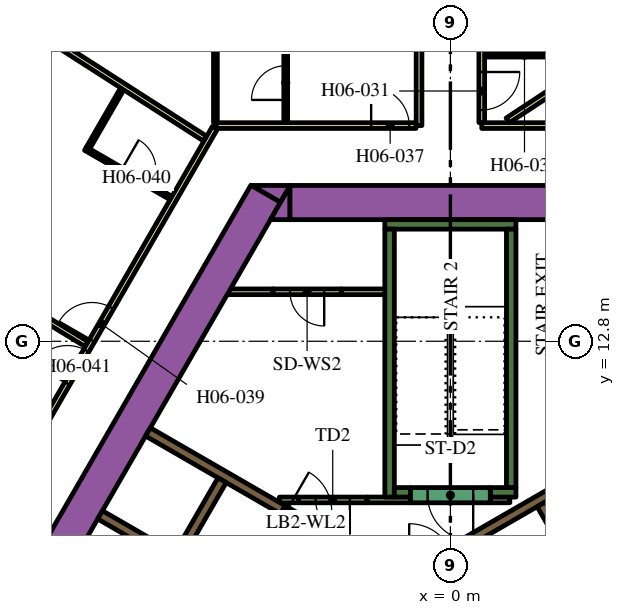
"""IFC4 building model, lengths in metres.
Left out: names, types, materials, properties, quantities, classifications, styles, units other than length and angle.
Written with IfcOpenShell. Run it as: python <this file> out.ifc"""

import sys

from ifc_helpers import new_model, si_unit, direction, frame, frame_2d, origin, place, context, subcontext, project, spatial, polyline, rectangle, outline, extrude, element, fill, save


model = new_model("IFC4")
c1 = context("Model", 3, precision=1e-05, world=origin(), true_north=direction((0.0, 1.0)))
c2 = subcontext(c1, "Body", "Model", "MODEL_VIEW")
j1 = project(units=[si_unit("LENGTHUNIT", "METRE"), si_unit("PLANEANGLEUNIT", "RADIAN")], contexts=[c1])
p1 = place(None, origin())
s1 = spatial("IfcSite", under=j1, at=p1, CompositionType="ELEMENT")
p2 = place(p1, origin())
s2 = spatial("IfcBuilding", under=s1, at=p2, CompositionType="ELEMENT")
p3 = place(p2, frame((0.0, 0.0, 91.5)))
s3 = spatial("IfcBuildingStorey", under=s2, at=p3, CompositionType="ELEMENT", Elevation=91.5)
p4 = place(p3, frame((-15.36, -1.503, 0.0), z_axis=(0.0, 0.0, 1.0), x_axis=(0.50000389221, 0.866023156604, 0.0)))
e1 = element("IfcWall", 1, at=p4, inside=s3, PredefinedType="SOLIDWALL", context=c2, shape_type="SweptSolid", body=[
    extrude(rectangle(XDim=21.0, YDim=0.9, at=frame_2d((10.5, 0.0))), origin(), (0.0, 0.0, 1.0), 3.9),
])
p5 = place(p3, origin())
e2 = element("IfcWall", 2, at=p5, inside=s3, PredefinedType="SOLIDWALL", context=c2, shape_type="SweptSolid", body=[
    extrude(outline(polyline([(-4.215, 16.9), (-4.469, 16.46), (-5.231, 16.9), (-4.215, 16.9)])), origin(), (0.0, 0.0, 1.0), 3.9),
])
p6 = place(p3, frame((-4.224, 16.45, 0.0), z_axis=(0.0, 0.0, 1.0), x_axis=(1.0, 0.0, 0.0)))
e3 = element("IfcWall", 3, at=p6, inside=s3, PredefinedType="SOLIDWALL", context=c2, shape_type="SweptSolid", body=[
    extrude(rectangle(XDim=9.488, YDim=0.9, at=frame_2d((4.744, 0.0))), origin(), (0.0, 0.0, 1.0), 3.9),
])
e4 = element("IfcWall", 4, at=p5, inside=s3, PredefinedType="SOLIDWALL", context=c2, shape_type="SweptSolid", body=[
    extrude(outline(polyline([(-4.734, 16.0), (-4.226, 16.88), (-4.226, 16.0), (-4.734, 16.0)])), origin(), (0.0, 0.0, 1.0), 3.9),
])
p7 = place(p3, frame((-1.725, 15.875, 0.0), z_axis=(0.0, 0.0, 1.0), x_axis=(1.0, 0.0, 0.0)))
e5 = element("IfcWall", 5, at=p7, inside=s3, PredefinedType="SOLIDWALL", context=c2, shape_type="SweptSolid", body=[
    extrude(rectangle(XDim=3.45, YDim=0.25, at=frame_2d((1.725, 0.0))), origin(), (0.0, 0.0, 1.0), 3.9),
])
p8 = place(p3, frame((1.6, 8.95, 0.0), z_axis=(0.0, 0.0, 1.0), x_axis=(0.0, 1.0, 0.0)))
e6 = element("IfcWall", 6, at=p8, inside=s3, PredefinedType="SOLIDWALL", context=c2, shape_type="SweptSolid", body=[
    extrude(rectangle(XDim=6.8, YDim=0.25, at=frame_2d((3.4, 0.0))), origin(), (0.0, 0.0, 1.0), 3.9),
])
p9 = place(p3, frame((1.05, 8.825, 0.0), z_axis=(0.0, 0.0, 1.0), x_axis=(1.0, 0.0, 0.0)))
e7 = element("IfcWall", 7, at=p9, inside=s3, PredefinedType="SOLIDWALL", context=c2, shape_type="SweptSolid", body=[
    extrude(rectangle(XDim=0.675, YDim=0.25, at=frame_2d((0.337, 0.0))), origin(), (0.0, 0.0, 1.0), 3.9),
])
p10 = place(p3, frame((-1.6, 8.7, 0.0), z_axis=(0.0, 0.0, 1.0), x_axis=(0.0, 1.0, 0.0)))
e8 = element("IfcWall", 8, at=p10, inside=s3, PredefinedType="SOLIDWALL", context=c2, shape_type="SweptSolid", body=[
    extrude(rectangle(XDim=7.05, YDim=0.25, at=frame_2d((3.525, 0.0))), origin(), (0.0, 0.0, 1.0), 3.9),
])
p11 = place(p3, frame((-1.475, 8.825, 0.0), z_axis=(0.0, 0.0, 1.0), x_axis=(1.0, 0.0, 0.0)))
e9 = element("IfcWall", 9, at=p11, inside=s3, PredefinedType="SOLIDWALL", context=c2, shape_type="SweptSolid", body=[
    extrude(rectangle(XDim=0.425, YDim=0.25, at=frame_2d((0.212, 0.0))), origin(), (0.0, 0.0, 1.0), 3.9),
])
p12 = place(p3, frame((0.314, 7.456, 0.0), z_axis=(0.0, 0.0, 1.0), x_axis=(0.866013897511, 0.50001992892, 0.0)))
e10 = element("IfcWall", 10, at=p12, inside=s3, PredefinedType="SOLIDWALL", context=c2, shape_type="SweptSolid", body=[
    extrude(rectangle(XDim=3.268, YDim=0.25, at=frame_2d((1.634, 0.0))), origin(), (0.0, 0.0, 1.0), 3.9),
])
e11 = element("IfcWall", 11, at=p5, inside=s3, PredefinedType="SOLIDWALL", context=c2, shape_type="SweptSolid", body=[
    extrude(outline(polyline([(-3.128, 7.481), (-3.259, 7.557), (-3.134, 7.773), (-3.003, 7.698), (-3.128, 7.481)])), origin(), (0.0, 0.0, 1.0), 3.9),
])
p13 = place(p3, frame((-7.314, 7.132, 0.0), z_axis=(0.0, 0.0, 1.0), x_axis=(-0.866008176907, 0.50002983664, 0.0)))
e12 = element("IfcWall", 12, at=p13, inside=s3, PredefinedType="SOLIDWALL", context=c2, shape_type="SweptSolid", body=[
    extrude(rectangle(XDim=2.2, YDim=0.25, at=frame_2d((1.1, 0.0))), origin(), (0.0, 0.0, 1.0), 3.9),
])
p14 = place(p3, frame((-7.959, 10.415, 0.0), z_axis=(0.0, 0.0, 1.0), x_axis=(0.866020958405, -0.500007699544, 0.0)))
e13 = element("IfcWall", 13, at=p14, inside=s3, PredefinedType="SOLIDWALL", context=c2, shape_type="SweptSolid", body=[
    extrude(rectangle(XDim=4.1, YDim=0.25, at=frame_2d((2.05, 0.0))), origin(), (0.0, 0.0, 1.0), 3.9),
])
p15 = place(p3, frame((-3.997, 8.625, 0.0), z_axis=(0.0, 0.0, 1.0), x_axis=(-1.0, 0.0, 0.0)))
e14 = element("IfcWall", 14, at=p15, inside=s3, PredefinedType="PARTITIONING", context=c2, shape_type="SweptSolid", body=[
    extrude(rectangle(XDim=0.502, YDim=0.15, at=frame_2d((0.251, 0.0))), origin(), (0.0, 0.0, 1.0), 2.75),
])
p16 = place(p3, frame((-2.196, 8.625, 0.0), z_axis=(0.0, 0.0, 1.0), x_axis=(1.0, 0.0, 0.0)))
e15 = element("IfcWall", 15, at=p16, inside=s3, PredefinedType="PARTITIONING", context=c2, shape_type="SweptSolid", body=[
    extrude(rectangle(XDim=1.146, YDim=0.15, at=frame_2d((0.573, 0.0))), origin(), (0.0, 0.0, 1.0), 2.75),
])
p17 = place(p3, frame((-5.851, 14.102, 0.0), z_axis=(0.0, 0.0, 1.0), x_axis=(1.0, 0.0, 0.0)))
e16 = element("IfcWall", 16, at=p17, inside=s3, PredefinedType="PARTITIONING", context=c2, shape_type="SweptSolid", body=[
    extrude(rectangle(XDim=1.18, YDim=0.15, at=frame_2d((0.59, 0.0))), origin(), (0.0, 0.0, 1.0), 2.75),
])
p18 = place(p3, frame((-2.871, 14.102, 0.0), z_axis=(0.0, 0.0, 1.0), x_axis=(1.0, 0.0, 0.0)))
e17 = element("IfcWall", 17, at=p18, inside=s3, PredefinedType="PARTITIONING", context=c2, shape_type="SweptSolid", body=[
    extrude(rectangle(XDim=1.196, YDim=0.15, at=frame_2d((0.598, 0.0))), origin(), (0.0, 0.0, 1.0), 2.75),
])
p19 = place(p3, frame((1.05, 8.625, 0.0), z_axis=(0.0, 0.0, 1.0), x_axis=(1.0, 0.0, 0.0)))
e18 = element("IfcWall", 18, at=p19, inside=s3, PredefinedType="PARTITIONING", context=c2, shape_type="SweptSolid", body=[
    extrude(rectangle(XDim=0.514, YDim=0.15, at=frame_2d((0.257, 0.0))), origin(), (0.0, 0.0, 1.0), 2.75),
])
p20 = place(p3, frame((8.565, -2.185, 0.0), z_axis=(0.0, 0.0, 1.0), x_axis=(-0.499997954832, 0.866026584559, 0.0)))
e19 = element("IfcWall", 19, at=p20, inside=s3, PredefinedType="SOLIDWALL", context=c2, shape_type="SweptSolid", body=[
    extrude(rectangle(XDim=12.35, YDim=0.25, at=frame_2d((6.175, 0.0))), origin(), (0.0, 0.0, 1.0), 3.9),
])
p21 = place(p20, frame((5.725, 0.0, 0.0)))
e20 = element("IfcOpeningElement", 20, at=p21, cuts=e19, PredefinedType="OPENING", context=c2, shape_type="SweptSolid", body=[
    extrude(rectangle(XDim=0.9, YDim=2.1, at=frame_2d((0.45, 1.05))), frame((0.0, 0.135, 0.0), z_axis=(0.0, -1.0, 0.0), x_axis=(1.0, 0.0, 0.0)), (0.0, 0.0, 1.0), 0.27),
])
p22 = place(p3, frame((-6.008, 9.144, 0.0), z_axis=(0.0, 0.0, 1.0), x_axis=(-0.500006956611, -0.866021387346, 0.0)))
e21 = element("IfcWall", 21, at=p22, inside=s3, PredefinedType="SOLIDWALL", context=c2, shape_type="SweptSolid", body=[
    extrude(rectangle(XDim=9.83, YDim=0.25, at=frame_2d((4.915, 0.0))), origin(), (0.0, 0.0, 1.0), 3.9),
])
p23 = place(p22, frame((6.985, 0.0, 0.0)))
e22 = element("IfcOpeningElement", 22, at=p23, cuts=e21, PredefinedType="OPENING", context=c2, shape_type="SweptSolid", body=[
    extrude(rectangle(XDim=0.9, YDim=2.1, at=frame_2d((0.45, 1.05))), frame((0.0, 0.135, 0.0), z_axis=(0.0, -1.0, 0.0), x_axis=(1.0, 0.0, 0.0)), (0.0, 0.0, 1.0), 0.27),
])
p24 = place(p3, frame((1.05, 8.75, 0.0), z_axis=(0.0, 0.0, 1.0), x_axis=(-1.0, 0.0, 0.0)))
e23 = element("IfcWall", 23, at=p24, inside=s3, PredefinedType="SOLIDWALL", context=c2, shape_type="SweptSolid", body=[
    extrude(rectangle(XDim=2.1, YDim=0.4, at=frame_2d((1.05, 0.0))), origin(), (0.0, 0.0, 1.0), 3.9),
])
p25 = place(p24, frame((0.45, 0.0, 0.0)))
e24 = element("IfcOpeningElement", 24, at=p25, cuts=e23, PredefinedType="OPENING", context=c2, shape_type="SweptSolid", body=[
    extrude(rectangle(XDim=1.2, YDim=2.1, at=frame_2d((0.6, 1.05))), frame((0.0, 0.21, 0.0), z_axis=(0.0, -1.0, 0.0), x_axis=(1.0, 0.0, 0.0)), (0.0, 0.0, 1.0), 0.42),
])
p26 = place(p3, frame((-2.196, 8.625, 0.0), z_axis=(0.0, 0.0, 1.0), x_axis=(-1.0, 0.0, 0.0)))
e25 = element("IfcWall", 25, at=p26, inside=s3, PredefinedType="PARTITIONING", context=c2, shape_type="SweptSolid", body=[
    extrude(rectangle(XDim=1.8, YDim=0.15, at=frame_2d((0.9, 0.0))), origin(), (0.0, 0.0, 1.0), 2.75),
])
p27 = place(p26, frame((0.45, 0.0, 0.0)))
e26 = element("IfcOpeningElement", 26, at=p27, cuts=e25, PredefinedType="OPENING", context=c2, shape_type="SweptSolid", body=[
    extrude(rectangle(XDim=0.9, YDim=2.1, at=frame_2d((0.45, 1.05))), frame((0.0, 0.085, 0.0), z_axis=(0.0, -1.0, 0.0), x_axis=(1.0, 0.0, 0.0)), (0.0, 0.0, 1.0), 0.17),
])
p28 = place(p3, frame((-4.409, 8.365, 0.0), z_axis=(0.0, 0.0, 1.0), x_axis=(0.866034573852, -0.49998411664, 0.0)))
e27 = element("IfcWall", 27, at=p28, inside=s3, PredefinedType="SOLIDWALL", context=c2, shape_type="SweptSolid", body=[
    extrude(rectangle(XDim=1.4, YDim=0.25, at=frame_2d((0.7, 0.0))), origin(), (0.0, 0.0, 1.0), 3.9),
])
p29 = place(p28, frame((0.1, 0.0, 0.0)))
e28 = element("IfcOpeningElement", 28, at=p29, cuts=e27, PredefinedType="OPENING", context=c2, shape_type="SweptSolid", body=[
    extrude(rectangle(XDim=1.2, YDim=2.1, at=frame_2d((0.6, 1.05))), frame((0.0, 0.135, 0.0), z_axis=(0.0, -1.0, 0.0), x_axis=(1.0, 0.0, 0.0)), (0.0, 0.0, 1.0), 0.27),
])
p30 = place(p3, frame((-2.871, 14.102, 0.0), z_axis=(0.0, 0.0, 1.0), x_axis=(-1.0, 0.0, 0.0)))
e29 = element("IfcWall", 29, at=p30, inside=s3, PredefinedType="PARTITIONING", context=c2, shape_type="SweptSolid", body=[
    extrude(rectangle(XDim=1.8, YDim=0.15, at=frame_2d((0.9, 0.0))), origin(), (0.0, 0.0, 1.0), 2.75),
])
p31 = place(p30, frame((0.45, 0.0, 0.0)))
e30 = element("IfcOpeningElement", 30, at=p31, cuts=e29, PredefinedType="OPENING", context=c2, shape_type="SweptSolid", body=[
    extrude(rectangle(XDim=0.9, YDim=2.1, at=frame_2d((0.45, 1.05))), frame((0.0, 0.085, 0.0), z_axis=(0.0, -1.0, 0.0), x_axis=(1.0, 0.0, 0.0)), (0.0, 0.0, 1.0), 0.17),
])
p32 = place(p3, frame((0.825, 18.475, 0.0), z_axis=(0.0, 0.0, 1.0), x_axis=(1.0, 0.0, 0.0)))
e31 = element("IfcWall", 31, at=p32, inside=s3, PredefinedType="PARTITIONING", context=c2, shape_type="SweptSolid", body=[
    extrude(rectangle(XDim=5.268, YDim=0.15, at=frame_2d((2.634, 0.0))), origin(), (0.0, 0.0, 1.0), 2.75),
])
p33 = place(p3, frame((0.825, 32.098, 0.0), z_axis=(0.0, 0.0, 1.0), x_axis=(0.0, -1.0, 0.0)))
e32 = element("IfcWall", 32, at=p33, inside=s3, PredefinedType="PARTITIONING", context=c2, shape_type="SweptSolid", body=[
    extrude(rectangle(XDim=13.543, YDim=0.15, at=frame_2d((6.772, 0.0))), origin(), (0.0, 0.0, 1.0), 2.75),
])
p34 = place(p33, frame((12.213, 0.0, 0.0)))
e33 = element("IfcOpeningElement", 33, at=p34, cuts=e32, PredefinedType="OPENING", context=c2, shape_type="SweptSolid", body=[
    extrude(rectangle(XDim=1.0, YDim=2.1, at=frame_2d((0.5, 1.05))), frame((0.0, 0.085, 0.0), z_axis=(0.0, -1.0, 0.0), x_axis=(1.0, 0.0, 0.0)), (0.0, 0.0, 1.0), 0.17),
])
p35 = place(p33, frame((8.49, 0.0, 0.0)))
e34 = element("IfcOpeningElement", 34, at=p35, cuts=e32, PredefinedType="OPENING", context=c2, shape_type="SweptSolid", body=[
    extrude(rectangle(XDim=1.0, YDim=2.1, at=frame_2d((0.5, 1.05))), frame((0.0, 0.085, 0.0), z_axis=(0.0, -1.0, 0.0), x_axis=(1.0, 0.0, 0.0)), (0.0, 0.0, 1.0), 0.17),
])
p36 = place(p3, frame((-0.825, 18.475, 0.0), z_axis=(0.0, 0.0, 1.0), x_axis=(0.0, 1.0, 0.0)))
e35 = element("IfcWall", 35, at=p36, inside=s3, PredefinedType="PARTITIONING", context=c2, shape_type="SweptSolid", body=[
    extrude(rectangle(XDim=13.623, YDim=0.15, at=frame_2d((6.812, 0.0))), origin(), (0.0, 0.0, 1.0), 2.75),
])
p37 = place(p36, frame((4.135, 0.0, 0.0)))
e36 = element("IfcOpeningElement", 36, at=p37, cuts=e35, PredefinedType="OPENING", context=c2, shape_type="SweptSolid", body=[
    extrude(rectangle(XDim=1.0, YDim=2.1, at=frame_2d((0.5, 1.05))), frame((0.0, 0.085, 0.0), z_axis=(0.0, -1.0, 0.0), x_axis=(1.0, 0.0, 0.0)), (0.0, 0.0, 1.0), 0.17),
])
p38 = place(p3, frame((-6.163, 18.475, 0.0), z_axis=(0.0, 0.0, 1.0), x_axis=(1.0, 0.0, 0.0)))
e37 = element("IfcWall", 37, at=p38, inside=s3, PredefinedType="PARTITIONING", context=c2, shape_type="SweptSolid", body=[
    extrude(rectangle(XDim=5.258, YDim=0.15, at=frame_2d((2.629, 0.0))), origin(), (0.0, 0.0, 1.0), 2.75),
])
p39 = place(p38, frame((4.078, 0.0, 0.0)))
e38 = element("IfcOpeningElement", 38, at=p39, cuts=e37, PredefinedType="OPENING", context=c2, shape_type="SweptSolid", body=[
    extrude(rectangle(XDim=1.0, YDim=2.1, at=frame_2d((0.5, 1.05))), frame((0.0, 0.085, 0.0), z_axis=(0.0, -1.0, 0.0), x_axis=(1.0, 0.0, 0.0)), (0.0, 0.0, 1.0), 0.17),
])
p40 = place(p3, frame((-19.081, -3.9, 0.0), z_axis=(0.0, 0.0, 1.0), x_axis=(0.499998313975, 0.866026377209, 0.0)))
e39 = element("IfcWall", 39, at=p40, inside=s3, PredefinedType="PARTITIONING", context=c2, shape_type="SweptSolid", body=[
    extrude(rectangle(XDim=25.766, YDim=0.15, at=frame_2d((12.883, 0.0))), origin(), (0.0, 0.0, 1.0), 2.75),
])
p41 = place(p40, frame((19.306, 0.0, 0.0)))
e40 = element("IfcOpeningElement", 40, at=p41, cuts=e39, PredefinedType="OPENING", context=c2, shape_type="SweptSolid", body=[
    extrude(rectangle(XDim=1.0, YDim=2.1, at=frame_2d((0.5, 1.05))), frame((0.0, 0.085, 0.0), z_axis=(0.0, -1.0, 0.0), x_axis=(1.0, 0.0, 0.0)), (0.0, 0.0, 1.0), 0.17),
])
p42 = place(p40, frame((18.0, 0.0, 0.0)))
e41 = element("IfcOpeningElement", 41, at=p42, cuts=e39, PredefinedType="OPENING", context=c2, shape_type="SweptSolid", body=[
    extrude(rectangle(XDim=1.0, YDim=2.1, at=frame_2d((0.5, 1.05))), frame((0.0, 0.085, 0.0), z_axis=(0.0, -1.0, 0.0), x_axis=(1.0, 0.0, 0.0)), (0.0, 0.0, 1.0), 0.17),
])
p43 = place(p40, frame((10.874, 0.0, 0.0)))
e42 = element("IfcOpeningElement", 42, at=p43, cuts=e39, PredefinedType="OPENING", context=c2, shape_type="SweptSolid", body=[
    extrude(rectangle(XDim=0.9, YDim=2.1, at=frame_2d((0.45, 1.05))), frame((0.0, 0.085, 0.0), z_axis=(0.0, -1.0, 0.0), x_axis=(1.0, 0.0, 0.0)), (0.0, 0.0, 1.0), 0.17),
])
p44 = place(p40, frame((8.548, 0.0, 0.0)))
e43 = element("IfcOpeningElement", 43, at=p44, cuts=e39, PredefinedType="OPENING", context=c2, shape_type="SweptSolid", body=[
    extrude(rectangle(XDim=1.1, YDim=2.1, at=frame_2d((0.55, 1.05))), frame((0.0, 0.085, 0.0), z_axis=(0.0, -1.0, 0.0), x_axis=(1.0, 0.0, 0.0)), (0.0, 0.0, 1.0), 0.17),
])
p45 = place(p40, frame((0.18, 0.0, 0.0)))
e44 = element("IfcOpeningElement", 44, at=p45, cuts=e39, PredefinedType="OPENING", context=c2, shape_type="SweptSolid", body=[
    extrude(rectangle(XDim=1.0, YDim=2.1, at=frame_2d((0.5, 1.05))), frame((0.0, 0.085, 0.0), z_axis=(0.0, -1.0, 0.0), x_axis=(1.0, 0.0, 0.0)), (0.0, 0.0, 1.0), 0.17),
])
p46 = place(p3, frame((-15.225, 16.167, 0.0), z_axis=(0.0, 0.0, 1.0), x_axis=(0.854088713274, -0.520127359266, 0.0)))
e45 = element("IfcWall", 45, at=p46, inside=s3, PredefinedType="PARTITIONING", context=c2, shape_type="SweptSolid", body=[
    extrude(rectangle(XDim=6.611, YDim=0.15, at=frame_2d((3.305, 0.0))), origin(), (0.0, 0.0, 1.0), 2.75),
])
p47 = place(p3, frame((-11.838, 21.585, 0.0), z_axis=(0.0, 0.0, 1.0), x_axis=(0.841699322813, -0.539946525108, 0.0)))
e46 = element("IfcWall", 46, at=p47, inside=s3, PredefinedType="PARTITIONING", context=c2, shape_type="SweptSolid", body=[
    extrude(rectangle(XDim=6.392, YDim=0.15, at=frame_2d((3.196, 0.0))), origin(), (0.0, 0.0, 1.0), 2.75),
])
p48 = place(p3, frame((10.592, 24.589, 0.0), z_axis=(0.0, 0.0, 1.0), x_axis=(-0.835337323748, -0.549737715236, 0.0)))
e47 = element("IfcWall", 47, at=p48, inside=s3, PredefinedType="PARTITIONING", context=c2, shape_type="SweptSolid", body=[
    extrude(rectangle(XDim=10.875, YDim=0.15, at=frame_2d((5.438, 0.0))), origin(), (0.0, 0.0, 1.0), 2.75),
])
p49 = place(p3, frame((0.9, 20.329, 0.0), z_axis=(0.0, 0.0, 1.0), x_axis=(1.0, 0.0, 0.0)))
e48 = element("IfcWall", 48, at=p49, inside=s3, PredefinedType="PARTITIONING", context=c2, shape_type="SweptSolid", body=[
    extrude(rectangle(XDim=2.95, YDim=0.1, at=frame_2d((1.475, 0.0))), origin(), (0.0, 0.0, 1.0), 2.75),
])
p50 = place(p49, frame((0.6, 0.0, 0.0)))
e49 = element("IfcOpeningElement", 49, at=p50, cuts=e48, PredefinedType="OPENING", context=c2, shape_type="SweptSolid", body=[
    extrude(rectangle(XDim=0.9, YDim=2.1, at=frame_2d((0.45, 1.05))), frame((0.0, 0.06, 0.0), z_axis=(0.0, -1.0, 0.0), x_axis=(1.0, 0.0, 0.0)), (0.0, 0.0, 1.0), 0.12),
])
p51 = place(p3, frame((-4.333, 18.55, 0.0), z_axis=(0.0, 0.0, 1.0), x_axis=(0.0, 1.0, 0.0)))
e50 = element("IfcWall", 50, at=p51, inside=s3, PredefinedType="PARTITIONING", context=c2, shape_type="SweptSolid", body=[
    extrude(rectangle(XDim=2.6, YDim=0.1, at=frame_2d((1.3, 0.0))), origin(), (0.0, 0.0, 1.0), 2.75),
])
p52 = place(p51, frame((0.6, 0.0, 0.0)))
e51 = element("IfcOpeningElement", 51, at=p52, cuts=e50, PredefinedType="OPENING", context=c2, shape_type="SweptSolid", body=[
    extrude(rectangle(XDim=0.9, YDim=2.1, at=frame_2d((0.45, 1.05))), frame((0.0, 0.06, 0.0), z_axis=(0.0, -1.0, 0.0), x_axis=(1.0, 0.0, 0.0)), (0.0, 0.0, 1.0), 0.12),
])
p53 = place(p3, frame((-6.183, 18.55, 0.0), z_axis=(0.0, 0.0, 1.0), x_axis=(0.0, 1.0, 0.0)))
e52 = element("IfcWall", 52, at=p53, inside=s3, PredefinedType="PARTITIONING", context=c2, shape_type="SweptSolid", body=[
    extrude(rectangle(XDim=2.6, YDim=0.1, at=frame_2d((1.3, 0.0))), origin(), (0.0, 0.0, 1.0), 2.75),
])
p54 = place(p3, frame((-9.603, 17.868, 0.0), z_axis=(0.0, 0.0, 1.0), x_axis=(0.866021400173, -0.500006934395, 0.0)))
e53 = element("IfcWall", 53, at=p54, inside=s3, PredefinedType="PARTITIONING", context=c2, shape_type="SweptSolid", body=[
    extrude(rectangle(XDim=2.6, YDim=0.1, at=frame_2d((1.3, 0.0))), origin(), (0.0, 0.0, 1.0), 2.75),
])
p55 = place(p54, frame((1.1, 0.0, 0.0)))
e54 = element("IfcOpeningElement", 54, at=p55, cuts=e53, PredefinedType="OPENING", context=c2, shape_type="SweptSolid", body=[
    extrude(rectangle(XDim=0.9, YDim=2.1, at=frame_2d((0.45, 1.05))), frame((0.0, 0.06, 0.0), z_axis=(0.0, -1.0, 0.0), x_axis=(1.0, 0.0, 0.0)), (0.0, 0.0, 1.0), 0.12),
])
p56 = place(p3, frame((-9.534, 17.886, 0.0), z_axis=(0.0, 0.0, 1.0), x_axis=(0.500041240653, 0.866001592173, 0.0)))
e55 = element("IfcWall", 55, at=p56, inside=s3, PredefinedType="PARTITIONING", context=c2, shape_type="SweptSolid", body=[
    extrude(rectangle(XDim=1.79, YDim=0.1, at=frame_2d((0.895, 0.0))), origin(), (0.0, 0.0, 1.0), 2.75),
])
p57 = place(p25, origin())
e56 = element("IfcDoor", 56, at=p57, inside=s3, OperationType="SINGLE_SWING_LEFT", PredefinedType="DOOR", context=c2, shape_type="SweptSolid", body=[
    extrude(rectangle(XDim=1.2, YDim=2.1, at=frame_2d((0.6, 1.05))), frame((0.0, 0.025, 0.0), z_axis=(0.0, -1.0, 0.0), x_axis=(1.0, 0.0, 0.0)), (0.0, 0.0, 1.0), 0.05),
])
fill(e24, e56)
p58 = place(p27, origin())
e57 = element("IfcDoor", 57, at=p58, inside=s3, OperationType="SINGLE_SWING_LEFT", PredefinedType="DOOR", context=c2, shape_type="SweptSolid", body=[
    extrude(rectangle(XDim=0.9, YDim=2.1, at=frame_2d((0.45, 1.05))), frame((0.0, 0.025, 0.0), z_axis=(0.0, -1.0, 0.0), x_axis=(1.0, 0.0, 0.0)), (0.0, 0.0, 1.0), 0.05),
])
fill(e26, e57)
p59 = place(p29, origin())
e58 = element("IfcDoor", 58, at=p59, inside=s3, OperationType="SINGLE_SWING_LEFT", PredefinedType="DOOR", context=c2, shape_type="SweptSolid", body=[
    extrude(rectangle(XDim=1.2, YDim=2.1, at=frame_2d((0.6, 1.05))), frame((0.0, 0.025, 0.0), z_axis=(0.0, -1.0, 0.0), x_axis=(1.0, 0.0, 0.0)), (0.0, 0.0, 1.0), 0.05),
])
fill(e28, e58)
p60 = place(p31, origin())
e59 = element("IfcDoor", 59, at=p60, inside=s3, OperationType="SINGLE_SWING_LEFT", PredefinedType="DOOR", context=c2, shape_type="SweptSolid", body=[
    extrude(rectangle(XDim=0.9, YDim=2.1, at=frame_2d((0.45, 1.05))), frame((0.0, 0.025, 0.0), z_axis=(0.0, -1.0, 0.0), x_axis=(1.0, 0.0, 0.0)), (0.0, 0.0, 1.0), 0.05),
])
fill(e30, e59)
p61 = place(p34, origin())
e60 = element("IfcDoor", 60, at=p61, inside=s3, OperationType="SINGLE_SWING_RIGHT", PredefinedType="DOOR", context=c2, shape_type="SweptSolid", body=[
    extrude(rectangle(XDim=1.0, YDim=2.1, at=frame_2d((0.5, 1.05))), frame((0.0, 0.025, 0.0), z_axis=(0.0, -1.0, 0.0), x_axis=(1.0, 0.0, 0.0)), (0.0, 0.0, 1.0), 0.05),
])
fill(e33, e60)
p62 = place(p50, origin())
e61 = element("IfcDoor", 61, at=p62, inside=s3, OperationType="SINGLE_SWING_LEFT", PredefinedType="DOOR", context=c2, shape_type="SweptSolid", body=[
    extrude(rectangle(XDim=0.9, YDim=2.1, at=frame_2d((0.45, 1.05))), frame((0.0, 0.025, 0.0), z_axis=(0.0, -1.0, 0.0), x_axis=(1.0, 0.0, 0.0)), (0.0, 0.0, 1.0), 0.05),
])
fill(e49, e61)
p63 = place(p39, origin())
e62 = element("IfcDoor", 62, at=p63, inside=s3, OperationType="SINGLE_SWING_RIGHT", PredefinedType="DOOR", context=c2, shape_type="SweptSolid", body=[
    extrude(rectangle(XDim=1.0, YDim=2.1, at=frame_2d((0.5, 1.05))), frame((0.0, 0.025, 0.0), z_axis=(0.0, -1.0, 0.0), x_axis=(1.0, 0.0, 0.0)), (0.0, 0.0, 1.0), 0.05),
])
fill(e38, e62)
p64 = place(p52, origin())
e63 = element("IfcDoor", 63, at=p64, inside=s3, OperationType="SINGLE_SWING_LEFT", PredefinedType="DOOR", context=c2, shape_type="SweptSolid", body=[
    extrude(rectangle(XDim=0.9, YDim=2.1, at=frame_2d((0.45, 1.05))), frame((0.0, 0.025, 0.0), z_axis=(0.0, -1.0, 0.0), x_axis=(1.0, 0.0, 0.0)), (0.0, 0.0, 1.0), 0.05),
])
fill(e51, e63)
p65 = place(p41, origin())
e64 = element("IfcDoor", 64, at=p65, inside=s3, OperationType="SINGLE_SWING_LEFT", PredefinedType="DOOR", context=c2, shape_type="SweptSolid", body=[
    extrude(rectangle(XDim=1.0, YDim=2.1, at=frame_2d((0.5, 1.05))), frame((0.0, 0.025, 0.0), z_axis=(0.0, -1.0, 0.0), x_axis=(1.0, 0.0, 0.0)), (0.0, 0.0, 1.0), 0.05),
])
fill(e40, e64)
p66 = place(p55, origin())
e65 = element("IfcDoor", 65, at=p66, inside=s3, OperationType="SINGLE_SWING_RIGHT", PredefinedType="DOOR", context=c2, shape_type="SweptSolid", body=[
    extrude(rectangle(XDim=0.9, YDim=2.1, at=frame_2d((0.45, 1.05))), frame((0.0, 0.025, 0.0), z_axis=(0.0, -1.0, 0.0), x_axis=(1.0, 0.0, 0.0)), (0.0, 0.0, 1.0), 0.05),
])
fill(e54, e65)
p67 = place(p42, origin())
e66 = element("IfcDoor", 66, at=p67, inside=s3, OperationType="SINGLE_SWING_RIGHT", PredefinedType="DOOR", context=c2, shape_type="SweptSolid", body=[
    extrude(rectangle(XDim=1.0, YDim=2.1, at=frame_2d((0.5, 1.05))), frame((0.0, 0.025, 0.0), z_axis=(0.0, -1.0, 0.0), x_axis=(1.0, 0.0, 0.0)), (0.0, 0.0, 1.0), 0.05),
])
fill(e41, e66)
save(model, sys.argv[1])
